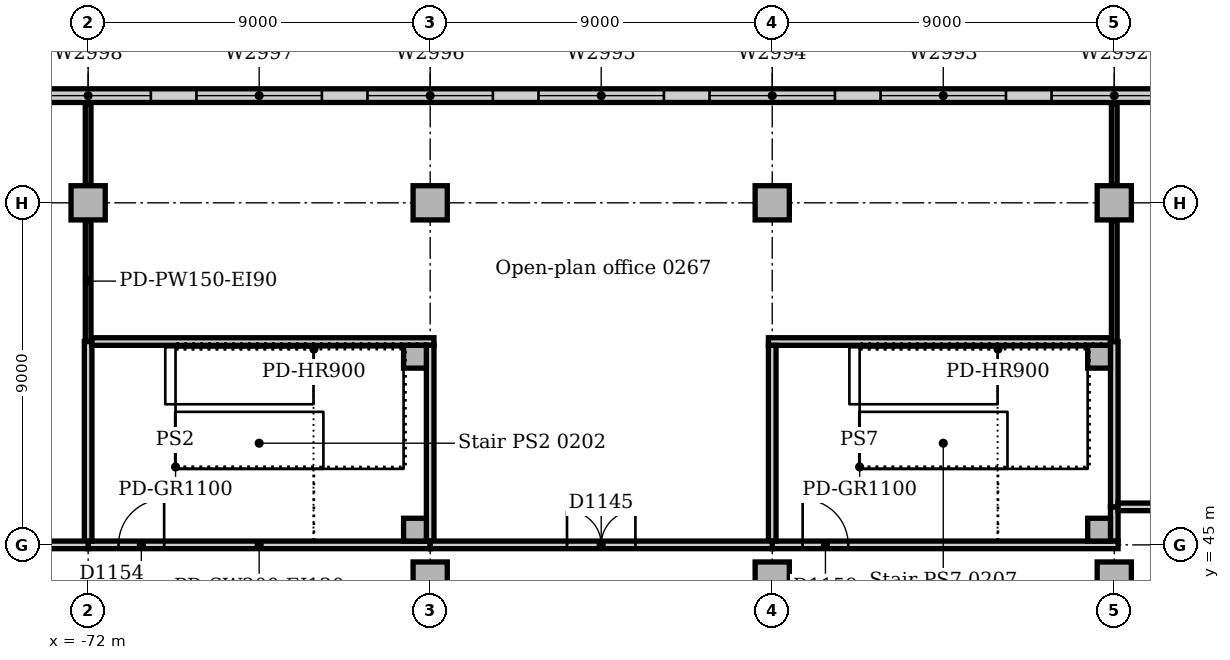
"""IFC4 building model, lengths in metres.
Left out: names, types, materials, properties, quantities, classifications, styles, units other than length and angle.
Written with IfcOpenShell. Run it as: python <this file> out.ifc"""

import sys

from ifc_helpers import new_model, si_unit, direction, frame, frame_2d, origin, origin_2d, place, context, subcontext, project, spatial, rectangle, extrude, element, fill, save


model = new_model("IFC4")
c1 = context("Model", 3, precision=1e-05, world=origin(), true_north=direction((0.0, 1.0)))
c2 = subcontext(c1, "Body", "Model", "MODEL_VIEW")
j1 = project(units=[si_unit("LENGTHUNIT", "METRE"), si_unit("PLANEANGLEUNIT", "RADIAN")], contexts=[c1])
p1 = place(None, origin())
s1 = spatial("IfcSite", under=j1, at=p1, CompositionType="ELEMENT")
p2 = place(p1, origin())
s2 = spatial("IfcBuilding", under=s1, at=p2, CompositionType="ELEMENT")
p3 = place(p2, frame((0.0, 0.0, 11.0)))
s3 = spatial("IfcBuildingStorey", under=s2, at=p3, CompositionType="ELEMENT", Elevation=11.0)
p4 = place(p3, frame((-68.398, 43.547, 0.0), z_axis=(0.0, 0.0, 1.0), x_axis=(1.0, 0.0, 0.0)))
e1 = element("IfcColumn", 1, at=p4, inside=s3, PredefinedType="COLUMN", context=c2, shape_type="SweptSolid", body=[
    extrude(rectangle(XDim=1.1, YDim=1.1, at=origin_2d()), origin(), (0.0, 0.0, 1.0), 4.7),
])
for number, where, z_axis, x_axis in (
    (2, (-63.0, 44.1, 0.0), (0.0, 0.0, 1.0), (1.0, 0.0, 0.0)),
    (3, (-54.0, 44.1, 0.0), (0.0, 0.0, 1.0), (1.0, 0.0, 0.0)),
    (4, (-45.0, 44.1, 0.0), (0.0, 0.0, 1.0), (1.0, 0.0, 0.0)),
    (5, (-72.0, 54.0, 0.0), (0.0, 0.0, 1.0), (1.0, 0.0, 0.0)),
    (6, (-63.0, 54.0, 0.0), (0.0, 0.0, 1.0), (1.0, 0.0, 0.0)),
    (7, (-54.0, 54.0, 0.0), (0.0, 0.0, 1.0), (1.0, 0.0, 0.0)),
    (8, (-45.0, 54.0, 0.0), (0.0, 0.0, 1.0), (1.0, 0.0, 0.0)),
):
    element("IfcColumn", number, at=place(p3, frame(where, z_axis=z_axis, x_axis=x_axis)), inside=s3, PredefinedType="COLUMN", context=c2, shape_type="SweptSolid", body=[
        extrude(rectangle(XDim=0.9, YDim=0.9, at=origin_2d()), origin(), (0.0, 0.0, 1.0), 4.7),
    ])
p5 = place(p3, frame((63.0, 56.82, 0.0), z_axis=(0.0, 0.0, 1.0), x_axis=(-1.0, 0.0, 0.0)))
e9 = element("IfcWall", 9, at=p5, inside=s3, PredefinedType="STANDARD", context=c2, shape_type="SweptSolid", body=[
    extrude(rectangle(XDim=144.0, YDim=0.36, at=frame_2d((72.0, 0.0))), origin(), (0.0, 0.0, 1.0), 4.7),
])
p6 = place(p5, frame((2.85, 0.0, 0.9)))
e10 = element("IfcOpeningElement", 10, at=p6, cuts=e9, PredefinedType="OPENING", context=c2, shape_type="SweptSolid", body=[
    extrude(rectangle(XDim=3.3, YDim=2.4, at=frame_2d((1.65, 1.2))), frame((0.0, 0.19, 0.0), z_axis=(0.0, -1.0, 0.0), x_axis=(1.0, 0.0, 0.0)), (0.0, 0.0, 1.0), 0.38),
])
p7 = place(p5, frame((7.35, 0.0, 0.9)))
e11 = element("IfcOpeningElement", 11, at=p7, cuts=e9, PredefinedType="OPENING", context=c2, shape_type="SweptSolid", body=[
    extrude(rectangle(XDim=3.3, YDim=2.4, at=frame_2d((1.65, 1.2))), frame((0.0, 0.19, 0.0), z_axis=(0.0, -1.0, 0.0), x_axis=(1.0, 0.0, 0.0)), (0.0, 0.0, 1.0), 0.38),
])
p8 = place(p5, frame((11.85, 0.0, 0.9)))
e12 = element("IfcOpeningElement", 12, at=p8, cuts=e9, PredefinedType="OPENING", context=c2, shape_type="SweptSolid", body=[
    extrude(rectangle(XDim=3.3, YDim=2.4, at=frame_2d((1.65, 1.2))), frame((0.0, 0.19, 0.0), z_axis=(0.0, -1.0, 0.0), x_axis=(1.0, 0.0, 0.0)), (0.0, 0.0, 1.0), 0.38),
])
p9 = place(p5, frame((16.35, 0.0, 0.9)))
e13 = element("IfcOpeningElement", 13, at=p9, cuts=e9, PredefinedType="OPENING", context=c2, shape_type="SweptSolid", body=[
    extrude(rectangle(XDim=3.3, YDim=2.4, at=frame_2d((1.65, 1.2))), frame((0.0, 0.19, 0.0), z_axis=(0.0, -1.0, 0.0), x_axis=(1.0, 0.0, 0.0)), (0.0, 0.0, 1.0), 0.38),
])
p10 = place(p5, frame((20.85, 0.0, 0.9)))
e14 = element("IfcOpeningElement", 14, at=p10, cuts=e9, PredefinedType="OPENING", context=c2, shape_type="SweptSolid", body=[
    extrude(rectangle(XDim=3.3, YDim=2.4, at=frame_2d((1.65, 1.2))), frame((0.0, 0.19, 0.0), z_axis=(0.0, -1.0, 0.0), x_axis=(1.0, 0.0, 0.0)), (0.0, 0.0, 1.0), 0.38),
])
p11 = place(p5, frame((25.35, 0.0, 0.9)))
e15 = element("IfcOpeningElement", 15, at=p11, cuts=e9, PredefinedType="OPENING", context=c2, shape_type="SweptSolid", body=[
    extrude(rectangle(XDim=3.3, YDim=2.4, at=frame_2d((1.65, 1.2))), frame((0.0, 0.19, 0.0), z_axis=(0.0, -1.0, 0.0), x_axis=(1.0, 0.0, 0.0)), (0.0, 0.0, 1.0), 0.38),
])
p12 = place(p5, frame((29.85, 0.0, 0.9)))
e16 = element("IfcOpeningElement", 16, at=p12, cuts=e9, PredefinedType="OPENING", context=c2, shape_type="SweptSolid", body=[
    extrude(rectangle(XDim=3.3, YDim=2.4, at=frame_2d((1.65, 1.2))), frame((0.0, 0.19, 0.0), z_axis=(0.0, -1.0, 0.0), x_axis=(1.0, 0.0, 0.0)), (0.0, 0.0, 1.0), 0.38),
])
p13 = place(p5, frame((34.35, 0.0, 0.9)))
e17 = element("IfcOpeningElement", 17, at=p13, cuts=e9, PredefinedType="OPENING", context=c2, shape_type="SweptSolid", body=[
    extrude(rectangle(XDim=3.3, YDim=2.4, at=frame_2d((1.65, 1.2))), frame((0.0, 0.19, 0.0), z_axis=(0.0, -1.0, 0.0), x_axis=(1.0, 0.0, 0.0)), (0.0, 0.0, 1.0), 0.38),
])
p14 = place(p5, frame((38.85, 0.0, 0.9)))
e18 = element("IfcOpeningElement", 18, at=p14, cuts=e9, PredefinedType="OPENING", context=c2, shape_type="SweptSolid", body=[
    extrude(rectangle(XDim=3.3, YDim=2.4, at=frame_2d((1.65, 1.2))), frame((0.0, 0.19, 0.0), z_axis=(0.0, -1.0, 0.0), x_axis=(1.0, 0.0, 0.0)), (0.0, 0.0, 1.0), 0.38),
])
p15 = place(p5, frame((43.35, 0.0, 0.9)))
e19 = element("IfcOpeningElement", 19, at=p15, cuts=e9, PredefinedType="OPENING", context=c2, shape_type="SweptSolid", body=[
    extrude(rectangle(XDim=3.3, YDim=2.4, at=frame_2d((1.65, 1.2))), frame((0.0, 0.19, 0.0), z_axis=(0.0, -1.0, 0.0), x_axis=(1.0, 0.0, 0.0)), (0.0, 0.0, 1.0), 0.38),
])
p16 = place(p5, frame((47.85, 0.0, 0.9)))
e20 = element("IfcOpeningElement", 20, at=p16, cuts=e9, PredefinedType="OPENING", context=c2, shape_type="SweptSolid", body=[
    extrude(rectangle(XDim=3.3, YDim=2.4, at=frame_2d((1.65, 1.2))), frame((0.0, 0.19, 0.0), z_axis=(0.0, -1.0, 0.0), x_axis=(1.0, 0.0, 0.0)), (0.0, 0.0, 1.0), 0.38),
])
p17 = place(p5, frame((52.35, 0.0, 0.9)))
e21 = element("IfcOpeningElement", 21, at=p17, cuts=e9, PredefinedType="OPENING", context=c2, shape_type="SweptSolid", body=[
    extrude(rectangle(XDim=3.3, YDim=2.4, at=frame_2d((1.65, 1.2))), frame((0.0, 0.19, 0.0), z_axis=(0.0, -1.0, 0.0), x_axis=(1.0, 0.0, 0.0)), (0.0, 0.0, 1.0), 0.38),
])
p18 = place(p5, frame((56.85, 0.0, 0.9)))
e22 = element("IfcOpeningElement", 22, at=p18, cuts=e9, PredefinedType="OPENING", context=c2, shape_type="SweptSolid", body=[
    extrude(rectangle(XDim=3.3, YDim=2.4, at=frame_2d((1.65, 1.2))), frame((0.0, 0.19, 0.0), z_axis=(0.0, -1.0, 0.0), x_axis=(1.0, 0.0, 0.0)), (0.0, 0.0, 1.0), 0.38),
])
p19 = place(p5, frame((92.85, 0.0, 0.9)))
e23 = element("IfcOpeningElement", 23, at=p19, cuts=e9, PredefinedType="OPENING", context=c2, shape_type="SweptSolid", body=[
    extrude(rectangle(XDim=3.3, YDim=2.4, at=frame_2d((1.65, 1.2))), frame((0.0, 0.19, 0.0), z_axis=(0.0, -1.0, 0.0), x_axis=(1.0, 0.0, 0.0)), (0.0, 0.0, 1.0), 0.38),
])
p20 = place(p5, frame((97.35, 0.0, 0.9)))
e24 = element("IfcOpeningElement", 24, at=p20, cuts=e9, PredefinedType="OPENING", context=c2, shape_type="SweptSolid", body=[
    extrude(rectangle(XDim=3.3, YDim=2.4, at=frame_2d((1.65, 1.2))), frame((0.0, 0.19, 0.0), z_axis=(0.0, -1.0, 0.0), x_axis=(1.0, 0.0, 0.0)), (0.0, 0.0, 1.0), 0.38),
])
p21 = place(p5, frame((101.85, 0.0, 0.9)))
e25 = element("IfcOpeningElement", 25, at=p21, cuts=e9, PredefinedType="OPENING", context=c2, shape_type="SweptSolid", body=[
    extrude(rectangle(XDim=3.3, YDim=2.4, at=frame_2d((1.65, 1.2))), frame((0.0, 0.19, 0.0), z_axis=(0.0, -1.0, 0.0), x_axis=(1.0, 0.0, 0.0)), (0.0, 0.0, 1.0), 0.38),
])
p22 = place(p5, frame((106.35, 0.0, 0.9)))
e26 = element("IfcOpeningElement", 26, at=p22, cuts=e9, PredefinedType="OPENING", context=c2, shape_type="SweptSolid", body=[
    extrude(rectangle(XDim=3.3, YDim=2.4, at=frame_2d((1.65, 1.2))), frame((0.0, 0.19, 0.0), z_axis=(0.0, -1.0, 0.0), x_axis=(1.0, 0.0, 0.0)), (0.0, 0.0, 1.0), 0.38),
])
p23 = place(p5, frame((110.85, 0.0, 0.9)))
e27 = element("IfcOpeningElement", 27, at=p23, cuts=e9, PredefinedType="OPENING", context=c2, shape_type="SweptSolid", body=[
    extrude(rectangle(XDim=3.3, YDim=2.4, at=frame_2d((1.65, 1.2))), frame((0.0, 0.19, 0.0), z_axis=(0.0, -1.0, 0.0), x_axis=(1.0, 0.0, 0.0)), (0.0, 0.0, 1.0), 0.38),
])
p24 = place(p5, frame((115.35, 0.0, 0.9)))
e28 = element("IfcOpeningElement", 28, at=p24, cuts=e9, PredefinedType="OPENING", context=c2, shape_type="SweptSolid", body=[
    extrude(rectangle(XDim=3.3, YDim=2.4, at=frame_2d((1.65, 1.2))), frame((0.0, 0.19, 0.0), z_axis=(0.0, -1.0, 0.0), x_axis=(1.0, 0.0, 0.0)), (0.0, 0.0, 1.0), 0.38),
])
p25 = place(p5, frame((119.85, 0.0, 0.9)))
e29 = element("IfcOpeningElement", 29, at=p25, cuts=e9, PredefinedType="OPENING", context=c2, shape_type="SweptSolid", body=[
    extrude(rectangle(XDim=3.3, YDim=2.4, at=frame_2d((1.65, 1.2))), frame((0.0, 0.19, 0.0), z_axis=(0.0, -1.0, 0.0), x_axis=(1.0, 0.0, 0.0)), (0.0, 0.0, 1.0), 0.38),
])
p26 = place(p5, frame((124.35, 0.0, 0.9)))
e30 = element("IfcOpeningElement", 30, at=p26, cuts=e9, PredefinedType="OPENING", context=c2, shape_type="SweptSolid", body=[
    extrude(rectangle(XDim=3.3, YDim=2.4, at=frame_2d((1.65, 1.2))), frame((0.0, 0.19, 0.0), z_axis=(0.0, -1.0, 0.0), x_axis=(1.0, 0.0, 0.0)), (0.0, 0.0, 1.0), 0.38),
])
p27 = place(p5, frame((128.85, 0.0, 0.9)))
e31 = element("IfcOpeningElement", 31, at=p27, cuts=e9, PredefinedType="OPENING", context=c2, shape_type="SweptSolid", body=[
    extrude(rectangle(XDim=3.3, YDim=2.4, at=frame_2d((1.65, 1.2))), frame((0.0, 0.19, 0.0), z_axis=(0.0, -1.0, 0.0), x_axis=(1.0, 0.0, 0.0)), (0.0, 0.0, 1.0), 0.38),
])
p28 = place(p5, frame((133.35, 0.0, 0.9)))
e32 = element("IfcOpeningElement", 32, at=p28, cuts=e9, PredefinedType="OPENING", context=c2, shape_type="SweptSolid", body=[
    extrude(rectangle(XDim=3.3, YDim=2.4, at=frame_2d((1.65, 1.2))), frame((0.0, 0.19, 0.0), z_axis=(0.0, -1.0, 0.0), x_axis=(1.0, 0.0, 0.0)), (0.0, 0.0, 1.0), 0.38),
])
p29 = place(p5, frame((137.85, 0.0, 0.9)))
e33 = element("IfcOpeningElement", 33, at=p29, cuts=e9, PredefinedType="OPENING", context=c2, shape_type="SweptSolid", body=[
    extrude(rectangle(XDim=3.3, YDim=2.4, at=frame_2d((1.65, 1.2))), frame((0.0, 0.19, 0.0), z_axis=(0.0, -1.0, 0.0), x_axis=(1.0, 0.0, 0.0)), (0.0, 0.0, 1.0), 0.38),
])
for number, where, z_axis, x_axis in (
    (34, (-63.4, 49.95, 0.0), (0.0, 0.0, 1.0), (1.0, 0.0, 0.0)),
    (35, (-63.4, 45.4, 0.0), (0.0, 0.0, 1.0), (1.0, 0.0, 0.0)),
    (36, (-45.4, 49.95, 0.0), (0.0, 0.0, 1.0), (1.0, 0.0, 0.0)),
    (37, (-45.4, 45.4, 0.0), (0.0, 0.0, 1.0), (1.0, 0.0, 0.0)),
):
    element("IfcColumn", number, at=place(p3, frame(where, z_axis=z_axis, x_axis=x_axis)), inside=s3, PredefinedType="COLUMN", context=c2, shape_type="SweptSolid", body=[
        extrude(rectangle(XDim=0.6, YDim=0.6, at=origin_2d()), origin(), (0.0, 0.0, 1.0), 5.0),
    ])
p30 = place(p3, frame((-72.0, 45.0, 0.0), z_axis=(0.0, 0.0, 1.0), x_axis=(1.0, 0.0, 0.0)))
e38 = element("IfcWall", 38, at=p30, inside=s3, PredefinedType="SOLIDWALL", context=c2, shape_type="SweptSolid", body=[
    extrude(rectangle(XDim=9.0, YDim=0.2, at=frame_2d((4.5, 0.0))), origin(), (0.0, 0.0, 1.0), 4.7),
])
p31 = place(p30, frame((0.8, 0.0, 0.0)))
e39 = element("IfcOpeningElement", 39, at=p31, cuts=e38, PredefinedType="OPENING", context=c2, shape_type="SweptSolid", body=[
    extrude(rectangle(XDim=1.2, YDim=2.1, at=frame_2d((0.6, 1.05))), frame((0.0, 0.11, 0.0), z_axis=(0.0, -1.0, 0.0), x_axis=(1.0, 0.0, 0.0)), (0.0, 0.0, 1.0), 0.22),
])
p32 = place(p3, frame((-72.0, 45.1, 0.0), z_axis=(0.0, 0.0, 1.0), x_axis=(0.0, 1.0, 0.0)))
e40 = element("IfcWall", 40, at=p32, inside=s3, PredefinedType="SOLIDWALL", context=c2, shape_type="SweptSolid", body=[
    extrude(rectangle(XDim=5.25, YDim=0.2, at=frame_2d((2.625, 0.0))), origin(), (0.0, 0.0, 1.0), 4.7),
])
p33 = place(p3, frame((-71.9, 50.35, 0.0), z_axis=(0.0, 0.0, 1.0), x_axis=(1.0, 0.0, 0.0)))
e41 = element("IfcWall", 41, at=p33, inside=s3, PredefinedType="SOLIDWALL", context=c2, shape_type="SweptSolid", body=[
    extrude(rectangle(XDim=9.0, YDim=0.2, at=frame_2d((4.5, 0.0))), origin(), (0.0, 0.0, 1.0), 4.7),
])
p34 = place(p3, frame((-63.0, 45.1, 0.0), z_axis=(0.0, 0.0, 1.0), x_axis=(0.0, 1.0, 0.0)))
e42 = element("IfcWall", 42, at=p34, inside=s3, PredefinedType="SOLIDWALL", context=c2, shape_type="SweptSolid", body=[
    extrude(rectangle(XDim=5.15, YDim=0.2, at=frame_2d((2.575, 0.0))), origin(), (0.0, 0.0, 1.0), 4.7),
])
p35 = place(p3, frame((-45.0, 45.1, 0.0), z_axis=(0.0, 0.0, 1.0), x_axis=(0.0, 1.0, 0.0)))
e43 = element("IfcWall", 43, at=p35, inside=s3, PredefinedType="SOLIDWALL", context=c2, shape_type="SweptSolid", body=[
    extrude(rectangle(XDim=0.9, YDim=0.2, at=frame_2d((0.45, 0.0))), origin(), (0.0, 0.0, 1.0), 4.7),
])
p36 = place(p3, frame((-54.0, 45.0, 0.0), z_axis=(0.0, 0.0, 1.0), x_axis=(1.0, 0.0, 0.0)))
e44 = element("IfcWall", 44, at=p36, inside=s3, PredefinedType="SOLIDWALL", context=c2, shape_type="SweptSolid", body=[
    extrude(rectangle(XDim=9.1, YDim=0.2, at=frame_2d((4.55, 0.0))), origin(), (0.0, 0.0, 1.0), 4.7),
])
p37 = place(p36, frame((0.8, 0.0, 0.0)))
e45 = element("IfcOpeningElement", 45, at=p37, cuts=e44, PredefinedType="OPENING", context=c2, shape_type="SweptSolid", body=[
    extrude(rectangle(XDim=1.2, YDim=2.1, at=frame_2d((0.6, 1.05))), frame((0.0, 0.11, 0.0), z_axis=(0.0, -1.0, 0.0), x_axis=(1.0, 0.0, 0.0)), (0.0, 0.0, 1.0), 0.22),
])
p38 = place(p3, frame((-54.1, 50.35, 0.0), z_axis=(0.0, 0.0, 1.0), x_axis=(1.0, 0.0, 0.0)))
e46 = element("IfcWall", 46, at=p38, inside=s3, PredefinedType="SOLIDWALL", context=c2, shape_type="SweptSolid", body=[
    extrude(rectangle(XDim=9.0, YDim=0.2, at=frame_2d((4.5, 0.0))), origin(), (0.0, 0.0, 1.0), 4.7),
])
p39 = place(p3, frame((-54.0, 45.1, 0.0), z_axis=(0.0, 0.0, 1.0), x_axis=(0.0, 1.0, 0.0)))
e47 = element("IfcWall", 47, at=p39, inside=s3, PredefinedType="SOLIDWALL", context=c2, shape_type="SweptSolid", body=[
    extrude(rectangle(XDim=5.15, YDim=0.2, at=frame_2d((2.575, 0.0))), origin(), (0.0, 0.0, 1.0), 4.7),
])
p40 = place(p3, frame((-45.0, 46.0, 0.0), z_axis=(0.0, 0.0, 1.0), x_axis=(0.0, 1.0, 0.0)))
e48 = element("IfcWall", 48, at=p40, inside=s3, PredefinedType="SOLIDWALL", context=c2, shape_type="SweptSolid", body=[
    extrude(rectangle(XDim=4.35, YDim=0.2, at=frame_2d((2.175, 0.0))), origin(), (0.0, 0.0, 1.0), 4.7),
])
p41 = place(p3, frame((-80.53, 45.0, 0.0), z_axis=(0.0, 0.0, 1.0), x_axis=(1.0, 0.0, 0.0)))
e49 = element("IfcWall", 49, at=p41, inside=s3, PredefinedType="PARTITIONING", context=c2, shape_type="SweptSolid", body=[
    extrude(rectangle(XDim=8.53, YDim=0.2, at=frame_2d((4.265, 0.0))), origin(), (0.0, 0.0, 1.0), 4.7),
])
p42 = place(p41, frame((2.03, 0.0, 0.0)))
e50 = element("IfcOpeningElement", 50, at=p42, cuts=e49, PredefinedType="OPENING", context=c2, shape_type="SweptSolid", body=[
    extrude(rectangle(XDim=1.0, YDim=2.1, at=frame_2d((0.5, 1.05))), frame((0.0, 0.11, 0.0), z_axis=(0.0, -1.0, 0.0), x_axis=(1.0, 0.0, 0.0)), (0.0, 0.0, 1.0), 0.22),
])
p43 = place(p3, frame((-63.0, 45.0, 0.0), z_axis=(0.0, 0.0, 1.0), x_axis=(1.0, 0.0, 0.0)))
e51 = element("IfcWall", 51, at=p43, inside=s3, PredefinedType="PARTITIONING", context=c2, shape_type="SweptSolid", body=[
    extrude(rectangle(XDim=9.0, YDim=0.2, at=frame_2d((4.5, 0.0))), origin(), (0.0, 0.0, 1.0), 4.7),
])
p44 = place(p43, frame((3.6, 0.0, 0.0)))
e52 = element("IfcOpeningElement", 52, at=p44, cuts=e51, PredefinedType="OPENING", context=c2, shape_type="SweptSolid", body=[
    extrude(rectangle(XDim=1.8, YDim=2.1, at=frame_2d((0.9, 1.05))), frame((0.0, 0.11, 0.0), z_axis=(0.0, -1.0, 0.0), x_axis=(1.0, 0.0, 0.0)), (0.0, 0.0, 1.0), 0.22),
])
p45 = place(p3, frame((-44.9, 46.0, 0.0), z_axis=(0.0, 0.0, 1.0), x_axis=(1.0, 0.0, 0.0)))
e53 = element("IfcWall", 53, at=p45, inside=s3, PredefinedType="PARTITIONING", context=c2, shape_type="SweptSolid", body=[
    extrude(rectangle(XDim=2.9, YDim=0.2, at=frame_2d((1.45, 0.0))), origin(), (0.0, 0.0, 1.0), 4.7),
])
p46 = place(p3, frame((-72.0, 50.35, 0.0), z_axis=(0.0, 0.0, 1.0), x_axis=(0.0, 1.0, 0.0)))
e54 = element("IfcWall", 54, at=p46, inside=s3, PredefinedType="PARTITIONING", context=c2, shape_type="SweptSolid", body=[
    extrude(rectangle(XDim=3.18, YDim=0.15, at=frame_2d((1.59, 0.0))), origin(), (0.0, 0.0, 1.0), 4.7),
])
p47 = place(p3, frame((-72.0, 54.47, 0.0), z_axis=(0.0, 0.0, 1.0), x_axis=(0.0, 1.0, 0.0)))
e55 = element("IfcWall", 55, at=p47, inside=s3, PredefinedType="PARTITIONING", context=c2, shape_type="SweptSolid", body=[
    extrude(rectangle(XDim=2.13, YDim=0.15, at=frame_2d((1.065, 0.0))), origin(), (0.0, 0.0, 1.0), 4.7),
])
p48 = place(p3, frame((-45.0, 50.35, 0.0), z_axis=(0.0, 0.0, 1.0), x_axis=(0.0, 1.0, 0.0)))
e56 = element("IfcWall", 56, at=p48, inside=s3, PredefinedType="PARTITIONING", context=c2, shape_type="SweptSolid", body=[
    extrude(rectangle(XDim=3.18, YDim=0.15, at=frame_2d((1.59, 0.0))), origin(), (0.0, 0.0, 1.0), 4.7),
])
p49 = place(p3, frame((-45.0, 54.47, 0.0), z_axis=(0.0, 0.0, 1.0), x_axis=(0.0, 1.0, 0.0)))
e57 = element("IfcWall", 57, at=p49, inside=s3, PredefinedType="PARTITIONING", context=c2, shape_type="SweptSolid", body=[
    extrude(rectangle(XDim=2.13, YDim=0.15, at=frame_2d((1.065, 0.0))), origin(), (0.0, 0.0, 1.0), 4.7),
])
p50 = place(p22, origin())
e58 = element("IfcWindow", 58, at=p50, inside=s3, PartitioningType="SINGLE_PANEL", PredefinedType="WINDOW", context=c2, shape_type="SweptSolid", body=[
    extrude(rectangle(XDim=3.3, YDim=2.4, at=frame_2d((1.65, 1.2))), frame((0.0, 0.13, 0.0), z_axis=(0.0, -1.0, 0.0), x_axis=(1.0, 0.0, 0.0)), (0.0, 0.0, 1.0), 0.06),
])
fill(e26, e58)
p51 = place(p23, origin())
e59 = element("IfcWindow", 59, at=p51, inside=s3, PartitioningType="SINGLE_PANEL", PredefinedType="WINDOW", context=c2, shape_type="SweptSolid", body=[
    extrude(rectangle(XDim=3.3, YDim=2.4, at=frame_2d((1.65, 1.2))), frame((0.0, 0.13, 0.0), z_axis=(0.0, -1.0, 0.0), x_axis=(1.0, 0.0, 0.0)), (0.0, 0.0, 1.0), 0.06),
])
fill(e27, e59)
p52 = place(p24, origin())
e60 = element("IfcWindow", 60, at=p52, inside=s3, PartitioningType="SINGLE_PANEL", PredefinedType="WINDOW", context=c2, shape_type="SweptSolid", body=[
    extrude(rectangle(XDim=3.3, YDim=2.4, at=frame_2d((1.65, 1.2))), frame((0.0, 0.13, 0.0), z_axis=(0.0, -1.0, 0.0), x_axis=(1.0, 0.0, 0.0)), (0.0, 0.0, 1.0), 0.06),
])
fill(e28, e60)
p53 = place(p25, origin())
e61 = element("IfcWindow", 61, at=p53, inside=s3, PartitioningType="SINGLE_PANEL", PredefinedType="WINDOW", context=c2, shape_type="SweptSolid", body=[
    extrude(rectangle(XDim=3.3, YDim=2.4, at=frame_2d((1.65, 1.2))), frame((0.0, 0.13, 0.0), z_axis=(0.0, -1.0, 0.0), x_axis=(1.0, 0.0, 0.0)), (0.0, 0.0, 1.0), 0.06),
])
fill(e29, e61)
p54 = place(p26, origin())
e62 = element("IfcWindow", 62, at=p54, inside=s3, PartitioningType="SINGLE_PANEL", PredefinedType="WINDOW", context=c2, shape_type="SweptSolid", body=[
    extrude(rectangle(XDim=3.3, YDim=2.4, at=frame_2d((1.65, 1.2))), frame((0.0, 0.13, 0.0), z_axis=(0.0, -1.0, 0.0), x_axis=(1.0, 0.0, 0.0)), (0.0, 0.0, 1.0), 0.06),
])
fill(e30, e62)
p55 = place(p27, origin())
e63 = element("IfcWindow", 63, at=p55, inside=s3, PartitioningType="SINGLE_PANEL", PredefinedType="WINDOW", context=c2, shape_type="SweptSolid", body=[
    extrude(rectangle(XDim=3.3, YDim=2.4, at=frame_2d((1.65, 1.2))), frame((0.0, 0.13, 0.0), z_axis=(0.0, -1.0, 0.0), x_axis=(1.0, 0.0, 0.0)), (0.0, 0.0, 1.0), 0.06),
])
fill(e31, e63)
p56 = place(p28, origin())
e64 = element("IfcWindow", 64, at=p56, inside=s3, PartitioningType="SINGLE_PANEL", PredefinedType="WINDOW", context=c2, shape_type="SweptSolid", body=[
    extrude(rectangle(XDim=3.3, YDim=2.4, at=frame_2d((1.65, 1.2))), frame((0.0, 0.13, 0.0), z_axis=(0.0, -1.0, 0.0), x_axis=(1.0, 0.0, 0.0)), (0.0, 0.0, 1.0), 0.06),
])
fill(e32, e64)
p57 = place(p44, origin())
e65 = element("IfcDoor", 65, at=p57, inside=s3, OperationType="DOUBLE_DOOR_SINGLE_SWING", PredefinedType="DOOR", context=c2, shape_type="SweptSolid", body=[
    extrude(rectangle(XDim=1.8, YDim=2.1, at=frame_2d((0.9, 1.05))), frame((0.0, 0.025, 0.0), z_axis=(0.0, -1.0, 0.0), x_axis=(1.0, 0.0, 0.0)), (0.0, 0.0, 1.0), 0.05),
])
fill(e52, e65)
p58 = place(p31, origin())
e66 = element("IfcDoor", 66, at=p58, inside=s3, OperationType="SINGLE_SWING_RIGHT", PredefinedType="DOOR", context=c2, shape_type="SweptSolid", body=[
    extrude(rectangle(XDim=1.2, YDim=2.1, at=frame_2d((0.6, 1.05))), frame((0.0, 0.025, 0.0), z_axis=(0.0, -1.0, 0.0), x_axis=(1.0, 0.0, 0.0)), (0.0, 0.0, 1.0), 0.05),
])
fill(e39, e66)
p59 = place(p37, origin())
e67 = element("IfcDoor", 67, at=p59, inside=s3, OperationType="SINGLE_SWING_LEFT", PredefinedType="DOOR", context=c2, shape_type="SweptSolid", body=[
    extrude(rectangle(XDim=1.2, YDim=2.1, at=frame_2d((0.6, 1.05))), frame((0.0, 0.025, 0.0), z_axis=(0.0, -1.0, 0.0), x_axis=(1.0, 0.0, 0.0)), (0.0, 0.0, 1.0), 0.05),
])
fill(e45, e67)
save(model, sys.argv[1])
